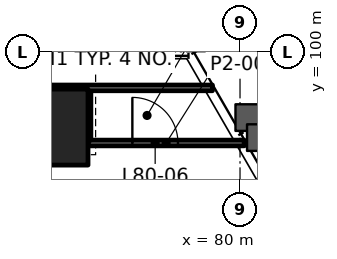
"""IFC4 building model, lengths in metres.
Left out: names, types, materials, properties, quantities, classifications, styles, units other than length and angle.
Written with IfcOpenShell. Run it as: python <this file> out.ifc"""

import sys

from ifc_helpers import new_model, si_unit, direction, frame, frame_2d, origin, origin_2d, place, context, subcontext, project, spatial, rectangle, extrude, element, fill, save


model = new_model("IFC4")
c1 = context("Model", 3, precision=1e-05, world=origin(), true_north=direction((0.0, 1.0)))
c2 = subcontext(c1, "Body", "Model", "MODEL_VIEW")
j1 = project(units=[si_unit("LENGTHUNIT", "METRE"), si_unit("PLANEANGLEUNIT", "RADIAN")], contexts=[c1])
p1 = place(None, origin())
s1 = spatial("IfcSite", under=j1, at=p1, CompositionType="ELEMENT")
p2 = place(p1, origin())
s2 = spatial("IfcBuilding", under=s1, at=p2, CompositionType="ELEMENT")
p3 = place(p2, frame((0.0, 0.0, 326.6)))
s3 = spatial("IfcBuildingStorey", under=s2, at=p3, CompositionType="ELEMENT", Elevation=326.6)
p4 = place(p3, frame((75.0, 98.018, 0.0), z_axis=(0.0, 0.0, 1.0), x_axis=(-1.0, 0.0, 0.0)))
e1 = element("IfcColumn", 1, at=p4, inside=s3, PredefinedType="COLUMN", context=c2, shape_type="SweptSolid", body=[
    extrude(rectangle(XDim=2.0, YDim=2.0, at=origin_2d()), origin(), (0.0, 0.0, 1.0), 5.0),
])
p5 = place(p3, frame((76.0, 97.6, 0.0), z_axis=(0.0, 0.0, 1.0), x_axis=(1.0, 0.0, 0.0)))
e2 = element("IfcWall", 2, at=p5, inside=s3, PredefinedType="PARTITIONING", context=c2, shape_type="SweptSolid", body=[
    extrude(rectangle(XDim=4.112, YDim=0.15, at=frame_2d((2.056, 0.0))), origin(), (0.0, 0.0, 1.0), 4.1),
])
p6 = place(p5, frame((1.167, 0.0, 0.0)))
e3 = element("IfcOpeningElement", 3, at=p6, cuts=e2, PredefinedType="OPENING", context=c2, shape_type="SweptSolid", body=[
    extrude(rectangle(XDim=1.2, YDim=2.1, at=frame_2d((0.6, 1.05))), frame((0.0, 0.085, 0.0), z_axis=(0.0, -1.0, 0.0), x_axis=(1.0, 0.0, 0.0)), (0.0, 0.0, 1.0), 0.17),
])
p7 = place(p3, frame((75.0, 99.05, 0.0), z_axis=(0.0, 0.0, 1.0), x_axis=(1.0, 0.0, 0.0)))
e4 = element("IfcWall", 4, at=p7, inside=s3, PredefinedType="PARTITIONING", context=c2, shape_type="SweptSolid", body=[
    extrude(rectangle(XDim=4.275, YDim=0.15, at=frame_2d((2.137, 0.0))), origin(), (0.0, 0.0, 1.0), 4.1),
])
p8 = place(p3, frame((76.0, 97.675, 0.0), z_axis=(0.0, 0.0, 1.0), x_axis=(0.0, 1.0, 0.0)))
e5 = element("IfcWall", 5, at=p8, inside=s3, PredefinedType="PARTITIONING", context=c2, shape_type="SweptSolid", body=[
    extrude(rectangle(XDim=1.268, YDim=0.15, at=frame_2d((0.634, 0.0))), origin(), (0.0, 0.0, 1.0), 4.1),
])
p9 = place(p6, origin())
e6 = element("IfcDoor", 6, at=p9, inside=s3, OperationType="DOUBLE_DOOR_SINGLE_SWING", PredefinedType="DOOR", context=c2, shape_type="SweptSolid", body=[
    extrude(rectangle(XDim=1.2, YDim=2.1, at=frame_2d((0.6, 1.05))), frame((0.0, 0.025, 0.0), z_axis=(0.0, -1.0, 0.0), x_axis=(1.0, 0.0, 0.0)), (0.0, 0.0, 1.0), 0.05),
])
fill(e3, e6)
save(model, sys.argv[1])
